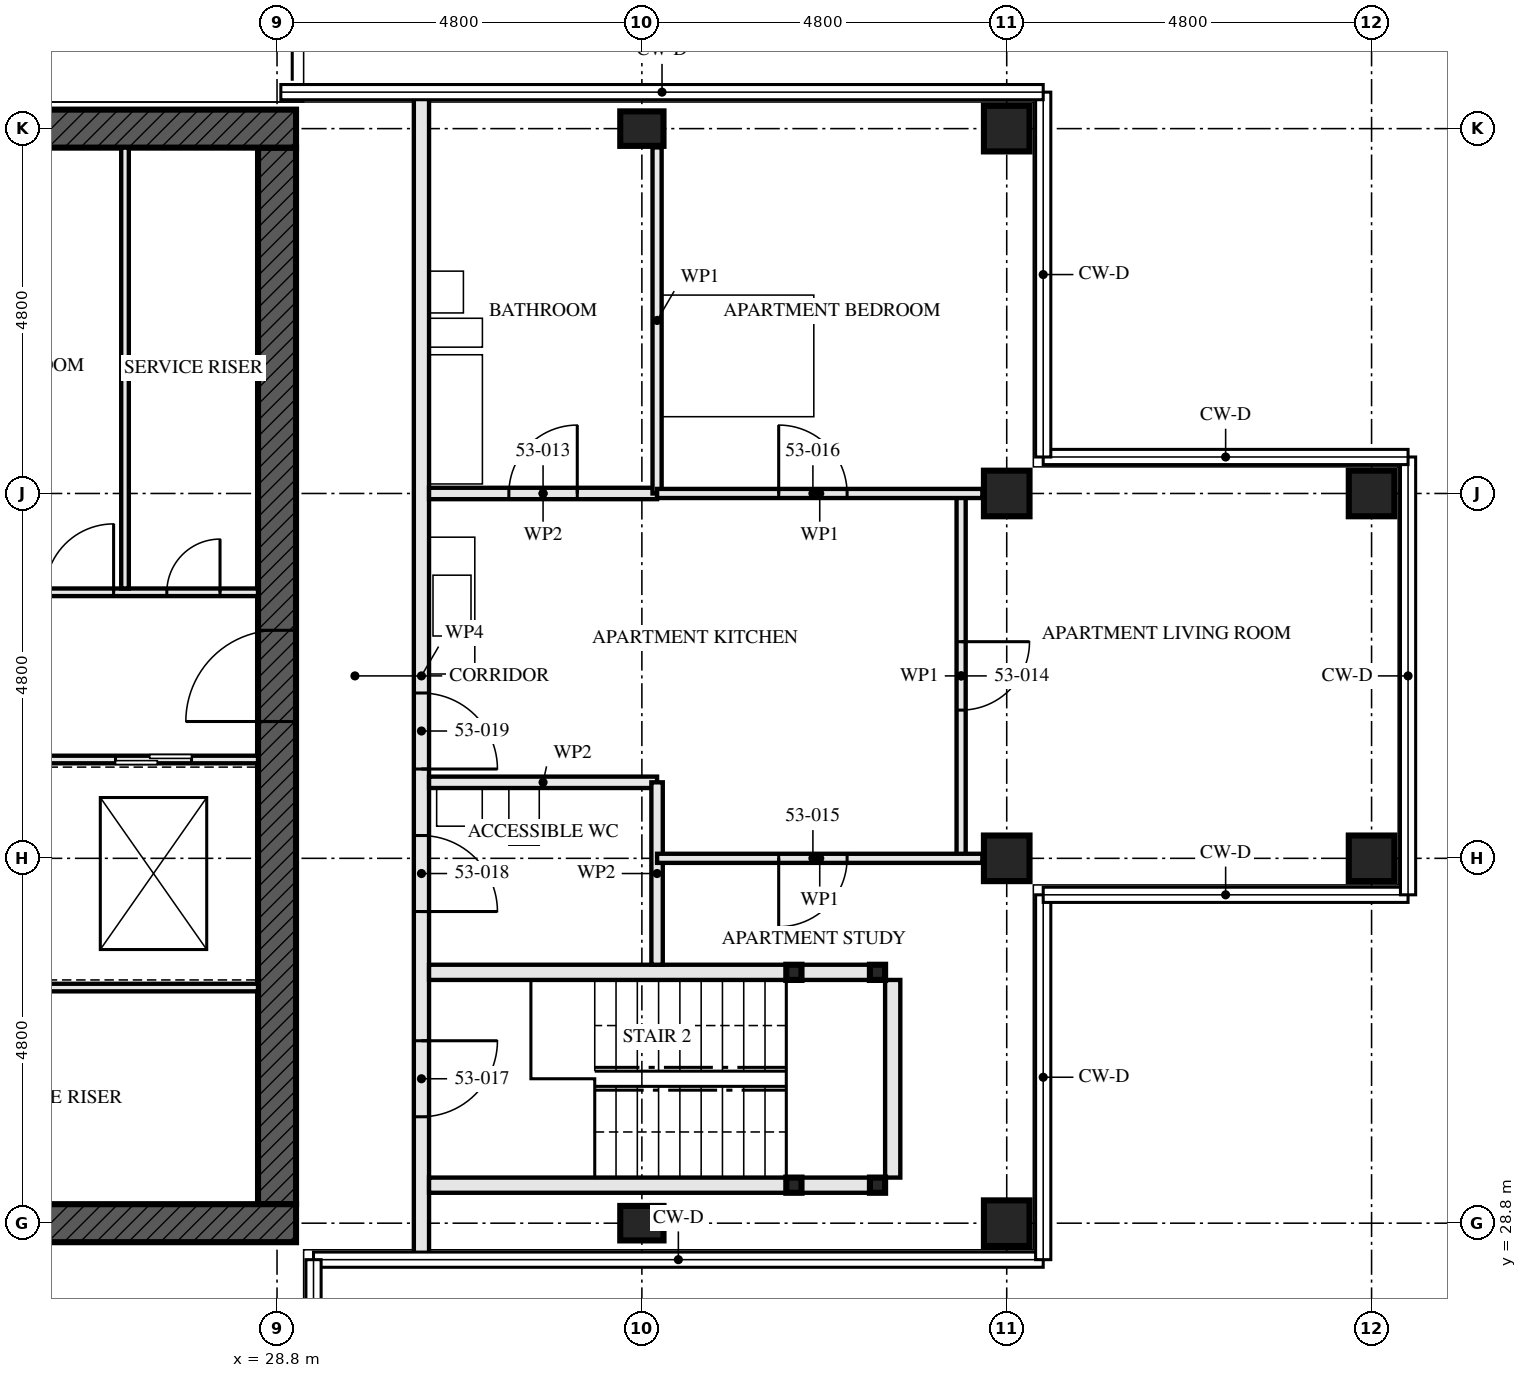
"""IFC4 building model, lengths in metres.
Left out: names, types, materials, properties, quantities, classifications, styles, units other than length and angle.
Written with IfcOpenShell. Run it as: python <this file> out.ifc"""

import sys

from ifc_helpers import new_model, si_unit, direction, frame, frame_2d, origin, origin_2d, place, context, subcontext, project, spatial, rectangle, hollow_rectangle, i_section, extrude, element, fill, save


model = new_model("IFC4")
c1 = context("Model", 3, precision=1e-05, world=origin(), true_north=direction((0.0, 1.0)))
c2 = subcontext(c1, "Body", "Model", "MODEL_VIEW")
j1 = project(units=[si_unit("LENGTHUNIT", "METRE"), si_unit("PLANEANGLEUNIT", "RADIAN")], contexts=[c1])
p1 = place(None, origin())
s1 = spatial("IfcSite", under=j1, at=p1, CompositionType="ELEMENT")
p2 = place(p1, origin())
s2 = spatial("IfcBuilding", under=s1, at=p2, CompositionType="ELEMENT")
p3 = place(p2, frame((0.0, 0.0, 194.5)))
s3 = spatial("IfcBuildingStorey", under=s2, at=p3, CompositionType="ELEMENT", Elevation=194.5)
for number, where, z_axis, x_axis in (
    (1, (33.6, 28.8, 0.0), (0.0, 0.0, 1.0), (0.0, 1.0, 0.0)),
    (2, (33.6, 43.2, 0.0), (0.0, 0.0, 1.0), (0.0, 1.0, 0.0)),
):
    element("IfcColumn", number, at=place(p3, frame(where, z_axis=z_axis, x_axis=x_axis)), inside=s3, PredefinedType="COLUMN", context=c2, shape_type="SweptSolid", body=[
        extrude(i_section(OverallWidth=0.454, OverallDepth=0.569, WebThickness=0.078, FlangeThickness=0.125, FilletRadius=0.015, at=origin_2d()), origin(), (0.0, 0.0, 1.0), 3.5),
    ])
for number, where, z_axis, x_axis in (
    (3, (38.4, 28.8, 0.0), (0.0, 0.0, 1.0), (0.0, 1.0, 0.0)),
    (4, (38.4, 33.6, 0.0), (0.0, 0.0, 1.0), (0.0, 1.0, 0.0)),
    (5, (38.4, 38.4, 0.0), (0.0, 0.0, 1.0), (0.0, 1.0, 0.0)),
    (6, (38.4, 43.2, 0.0), (0.0, 0.0, 1.0), (0.0, 1.0, 0.0)),
    (7, (43.2, 33.6, 0.0), (0.0, 0.0, 1.0), (0.0, 1.0, 0.0)),
    (8, (43.2, 38.4, 0.0), (0.0, 0.0, 1.0), (0.0, 1.0, 0.0)),
):
    element("IfcColumn", number, at=place(p3, frame(where, z_axis=z_axis, x_axis=x_axis)), inside=s3, PredefinedType="COLUMN", context=c2, shape_type="SweptSolid", body=[
        extrude(hollow_rectangle(XDim=0.6, YDim=0.6, WallThickness=0.05, at=origin_2d()), origin(), (0.0, 0.0, 1.0), 3.5),
    ])
p4 = place(p3, frame((14.15, 28.8, -0.17), z_axis=(0.0, 0.0, 1.0), x_axis=(1.0, 0.0, 0.0)))
e9 = element("IfcWall", 9, at=p4, inside=s3, PredefinedType="SHEAR", context=c2, shape_type="SweptSolid", body=[
    extrude(rectangle(XDim=14.9, YDim=0.5, at=frame_2d((7.45, 0.0))), origin(), (0.0, 0.0, 1.0), 3.5),
])
p5 = place(p4, frame((6.85, 0.0, 0.17)))
e10 = element("IfcOpeningElement", 10, at=p5, cuts=e9, PredefinedType="OPENING", context=c2, shape_type="SweptSolid", body=[
    extrude(rectangle(XDim=1.2, YDim=2.1, at=frame_2d((0.6, 1.05))), frame((0.0, 0.26, 0.0), z_axis=(0.0, -1.0, 0.0), x_axis=(1.0, 0.0, 0.0)), (0.0, 0.0, 1.0), 0.521),
])
p6 = place(p3, frame((29.05, 43.2, -0.17), z_axis=(0.0, 0.0, 1.0), x_axis=(-1.0, 0.0, 0.0)))
e11 = element("IfcWall", 11, at=p6, inside=s3, PredefinedType="SHEAR", context=c2, shape_type="SweptSolid", body=[
    extrude(rectangle(XDim=14.9, YDim=0.5, at=frame_2d((7.45, 0.0))), origin(), (0.0, 0.0, 1.0), 3.5),
])
p7 = place(p6, frame((6.95, 0.0, 0.17)))
e12 = element("IfcOpeningElement", 12, at=p7, cuts=e11, PredefinedType="OPENING", context=c2, shape_type="SweptSolid", body=[
    extrude(rectangle(XDim=1.0, YDim=2.4, at=frame_2d((0.5, 1.2))), frame((0.0, 0.26, 0.0), z_axis=(0.0, -1.0, 0.0), x_axis=(1.0, 0.0, 0.0)), (0.0, 0.0, 1.0), 0.521),
])
p8 = place(p3, frame((28.8, 29.05, -0.17), z_axis=(0.0, 0.0, 1.0), x_axis=(0.0, 1.0, 0.0)))
e13 = element("IfcWall", 13, at=p8, inside=s3, PredefinedType="SHEAR", context=c2, shape_type="SweptSolid", body=[
    extrude(rectangle(XDim=13.9, YDim=0.5, at=frame_2d((6.95, 0.0))), origin(), (0.0, 0.0, 1.0), 3.5),
])
p9 = place(p8, frame((6.35, 0.0, 0.17)))
e14 = element("IfcOpeningElement", 14, at=p9, cuts=e13, PredefinedType="OPENING", context=c2, shape_type="SweptSolid", body=[
    extrude(rectangle(XDim=1.2, YDim=2.1, at=frame_2d((0.6, 1.05))), frame((0.0, 0.26, 0.0), z_axis=(0.0, -1.0, 0.0), x_axis=(1.0, 0.0, 0.0)), (0.0, 0.0, 1.0), 0.521),
])
for number, where, z_axis, x_axis in (
    (15, (36.7, 29.3, 0.0), (0.0, 0.0, 1.0), (1.0, 0.0, 0.0)),
    (16, (36.7, 32.1, 0.0), (0.0, 0.0, 1.0), (1.0, 0.0, 0.0)),
    (17, (35.6, 29.3, 0.0), (0.0, 0.0, 1.0), (1.0, 0.0, 0.0)),
    (18, (35.6, 32.1, 0.0), (0.0, 0.0, 1.0), (1.0, 0.0, 0.0)),
):
    element("IfcColumn", number, at=place(p3, frame(where, z_axis=z_axis, x_axis=x_axis)), inside=s3, PredefinedType="COLUMN", context=c2, shape_type="SweptSolid", body=[
        extrude(hollow_rectangle(XDim=0.2, YDim=0.2, WallThickness=0.008, at=origin_2d()), origin(), (0.0, 0.0, 1.0), 3.33),
    ])
p10 = place(p3, frame((36.6, 29.3, 0.0), z_axis=(0.0, 0.0, 1.0), x_axis=(-1.0, 0.0, 0.0)))
e19 = element("IfcWall", 19, at=p10, inside=s3, PredefinedType="SOLIDWALL", context=c2, shape_type="SweptSolid", body=[
    extrude(rectangle(XDim=0.9, YDim=0.2, at=frame_2d((0.45, 0.0))), origin(), (0.0, 0.0, 1.0), 2.99),
])
p11 = place(p3, frame((35.5, 29.3, 0.0), z_axis=(0.0, 0.0, 1.0), x_axis=(-1.0, 0.0, 0.0)))
e20 = element("IfcWall", 20, at=p11, inside=s3, PredefinedType="SOLIDWALL", context=c2, shape_type="SweptSolid", body=[
    extrude(rectangle(XDim=4.7, YDim=0.2, at=frame_2d((2.35, 0.0))), origin(), (0.0, 0.0, 1.0), 2.99),
])
p12 = place(p3, frame((36.6, 32.1, 0.0), z_axis=(0.0, 0.0, 1.0), x_axis=(-1.0, 0.0, 0.0)))
e21 = element("IfcWall", 21, at=p12, inside=s3, PredefinedType="SOLIDWALL", context=c2, shape_type="SweptSolid", body=[
    extrude(rectangle(XDim=0.9, YDim=0.2, at=frame_2d((0.45, 0.0))), origin(), (0.0, 0.0, 1.0), 2.99),
])
p13 = place(p3, frame((35.5, 32.1, 0.0), z_axis=(0.0, 0.0, 1.0), x_axis=(-1.0, 0.0, 0.0)))
e22 = element("IfcWall", 22, at=p13, inside=s3, PredefinedType="SOLIDWALL", context=c2, shape_type="SweptSolid", body=[
    extrude(rectangle(XDim=4.7, YDim=0.2, at=frame_2d((2.35, 0.0))), origin(), (0.0, 0.0, 1.0), 2.99),
])
p14 = place(p3, frame((36.9, 29.4, 0.0), z_axis=(0.0, 0.0, 1.0), x_axis=(0.0, 1.0, 0.0)))
e23 = element("IfcWall", 23, at=p14, inside=s3, PredefinedType="SOLIDWALL", context=c2, shape_type="SweptSolid", body=[
    extrude(rectangle(XDim=2.6, YDim=0.2, at=frame_2d((1.3, 0.0))), origin(), (0.0, 0.0, 1.0), 3.33),
])
p15 = place(p3, frame((33.8, 32.2, 0.0), z_axis=(0.0, 0.0, 1.0), x_axis=(0.0, 1.0, 0.0)))
e24 = element("IfcWall", 24, at=p15, inside=s3, PredefinedType="PARTITIONING", context=c2, shape_type="SweptSolid", body=[
    extrude(rectangle(XDim=2.4, YDim=0.15, at=frame_2d((1.2, 0.0))), origin(), (0.0, 0.0, 1.0), 2.55),
])
p16 = place(p3, frame((33.8, 34.6, 0.0), z_axis=(0.0, 0.0, 1.0), x_axis=(-1.0, 0.0, 0.0)))
e25 = element("IfcWall", 25, at=p16, inside=s3, PredefinedType="PARTITIONING", context=c2, shape_type="SweptSolid", body=[
    extrude(rectangle(XDim=3.0, YDim=0.15, at=frame_2d((1.5, 0.0))), origin(), (0.0, 0.0, 1.0), 3.33),
])
p17 = place(p3, frame((33.8, 38.4, 0.0), z_axis=(0.0, 0.0, 1.0), x_axis=(-1.0, 0.0, 0.0)))
e26 = element("IfcWall", 26, at=p17, inside=s3, PredefinedType="PARTITIONING", context=c2, shape_type="SweptSolid", body=[
    extrude(rectangle(XDim=3.0, YDim=0.15, at=frame_2d((1.5, 0.0))), origin(), (0.0, 0.0, 1.0), 2.55),
])
p18 = place(p17, frame((1.05, 0.0, 0.0)))
e27 = element("IfcOpeningElement", 27, at=p18, cuts=e26, PredefinedType="OPENING", context=c2, shape_type="SweptSolid", body=[
    extrude(rectangle(XDim=0.9, YDim=2.1, at=frame_2d((0.45, 1.05))), frame((0.0, 0.085, 0.0), z_axis=(0.0, -1.0, 0.0), x_axis=(1.0, 0.0, 0.0)), (0.0, 0.0, 1.0), 0.171),
])
p19 = place(p3, frame((37.8, 33.6, 0.0), z_axis=(0.0, 0.0, 1.0), x_axis=(0.0, 1.0, 0.0)))
e28 = element("IfcWall", 28, at=p19, inside=s3, PredefinedType="PARTITIONING", context=c2, shape_type="SweptSolid", body=[
    extrude(rectangle(XDim=4.8, YDim=0.12, at=frame_2d((2.4, 0.0))), origin(), (0.0, 0.0, 1.0), 3.33),
])
p20 = place(p19, frame((1.95, 0.0, 0.0)))
e29 = element("IfcOpeningElement", 29, at=p20, cuts=e28, PredefinedType="OPENING", context=c2, shape_type="SweptSolid", body=[
    extrude(rectangle(XDim=0.9, YDim=2.1, at=frame_2d((0.45, 1.05))), frame((0.0, 0.071, 0.0), z_axis=(0.0, -1.0, 0.0), x_axis=(1.0, 0.0, 0.0)), (0.0, 0.0, 1.0), 0.141),
])
p21 = place(p3, frame((33.8, 38.4, 0.0), z_axis=(0.0, 0.0, 1.0), x_axis=(0.0, 1.0, 0.0)))
e30 = element("IfcWall", 30, at=p21, inside=s3, PredefinedType="PARTITIONING", context=c2, shape_type="SweptSolid", body=[
    extrude(rectangle(XDim=4.553, YDim=0.12, at=frame_2d((2.276, 0.0))), origin(), (0.0, 0.0, 1.0), 3.33),
])
p22 = place(p3, frame((38.08, 33.6, 0.0), z_axis=(0.0, 0.0, 1.0), x_axis=(-1.0, 0.0, 0.0)))
e31 = element("IfcWall", 31, at=p22, inside=s3, PredefinedType="PARTITIONING", context=c2, shape_type="SweptSolid", body=[
    extrude(rectangle(XDim=4.28, YDim=0.12, at=frame_2d((2.14, 0.0))), origin(), (0.0, 0.0, 1.0), 2.55),
])
p23 = place(p22, frame((1.78, 0.0, 0.0)))
e32 = element("IfcOpeningElement", 32, at=p23, cuts=e31, PredefinedType="OPENING", context=c2, shape_type="SweptSolid", body=[
    extrude(rectangle(XDim=0.9, YDim=2.1, at=frame_2d((0.45, 1.05))), frame((0.0, 0.071, 0.0), z_axis=(0.0, -1.0, 0.0), x_axis=(1.0, 0.0, 0.0)), (0.0, 0.0, 1.0), 0.141),
])
p24 = place(p3, frame((38.08, 38.4, 0.0), z_axis=(0.0, 0.0, 1.0), x_axis=(-1.0, 0.0, 0.0)))
e33 = element("IfcWall", 33, at=p24, inside=s3, PredefinedType="PARTITIONING", context=c2, shape_type="SweptSolid", body=[
    extrude(rectangle(XDim=4.28, YDim=0.12, at=frame_2d((2.14, 0.0))), origin(), (0.0, 0.0, 1.0), 2.55),
])
p25 = place(p24, frame((1.78, 0.0, 0.0)))
e34 = element("IfcOpeningElement", 34, at=p25, cuts=e33, PredefinedType="OPENING", context=c2, shape_type="SweptSolid", body=[
    extrude(rectangle(XDim=0.9, YDim=2.1, at=frame_2d((0.45, 1.05))), frame((0.0, 0.071, 0.0), z_axis=(0.0, -1.0, 0.0), x_axis=(1.0, 0.0, 0.0)), (0.0, 0.0, 1.0), 0.141),
])
p26 = place(p3, frame((30.7, 28.345, 0.0), z_axis=(0.0, 0.0, 1.0), x_axis=(0.0, 1.0, 0.0)))
e35 = element("IfcWall", 35, at=p26, inside=s3, PredefinedType="PARTITIONING", context=c2, shape_type="SweptSolid", body=[
    extrude(rectangle(XDim=15.31, YDim=0.2, at=frame_2d((7.655, 0.0))), origin(), (0.0, 0.0, 1.0), 2.32),
])
p27 = place(p26, frame((1.855, 0.0, 0.0)))
e36 = element("IfcOpeningElement", 36, at=p27, cuts=e35, PredefinedType="OPENING", context=c2, shape_type="SweptSolid", body=[
    extrude(rectangle(XDim=1.0, YDim=2.1, at=frame_2d((0.5, 1.05))), frame((0.0, 0.111, 0.0), z_axis=(0.0, -1.0, 0.0), x_axis=(1.0, 0.0, 0.0)), (0.0, 0.0, 1.0), 0.221),
])
p28 = place(p26, frame((4.555, 0.0, 0.0)))
e37 = element("IfcOpeningElement", 37, at=p28, cuts=e35, PredefinedType="OPENING", context=c2, shape_type="SweptSolid", body=[
    extrude(rectangle(XDim=1.0, YDim=2.1, at=frame_2d((0.5, 1.05))), frame((0.0, 0.111, 0.0), z_axis=(0.0, -1.0, 0.0), x_axis=(1.0, 0.0, 0.0)), (0.0, 0.0, 1.0), 0.221),
])
p29 = place(p26, frame((6.43, 0.0, 0.0)))
e38 = element("IfcOpeningElement", 38, at=p29, cuts=e35, PredefinedType="OPENING", context=c2, shape_type="SweptSolid", body=[
    extrude(rectangle(XDim=1.0, YDim=2.1, at=frame_2d((0.5, 1.05))), frame((0.0, 0.111, 0.0), z_axis=(0.0, -1.0, 0.0), x_axis=(1.0, 0.0, 0.0)), (0.0, 0.0, 1.0), 0.221),
])
p30 = place(p3, frame((26.8, 37.15, 0.0), z_axis=(0.0, 0.0, 1.0), x_axis=(0.0, 1.0, 0.0)))
e39 = element("IfcWall", 39, at=p30, inside=s3, PredefinedType="SOLIDWALL", context=c2, shape_type="SweptSolid", body=[
    extrude(rectangle(XDim=5.8, YDim=0.1, at=frame_2d((2.9, 0.0))), origin(), (0.0, 0.0, 1.0), 3.33),
])
p31 = place(p3, frame((23.05, 34.9, 0.0), z_axis=(0.0, 0.0, 1.0), x_axis=(1.0, 0.0, 0.0)))
e40 = element("IfcWall", 40, at=p31, inside=s3, PredefinedType="SOLIDWALL", context=c2, shape_type="SweptSolid", body=[
    extrude(rectangle(XDim=5.5, YDim=0.1, at=frame_2d((2.75, 0.0))), origin(), (0.0, 0.0, 1.0), 3.33),
])
p32 = place(p31, frame((0.85, 0.0, 0.0)))
e41 = element("IfcOpeningElement", 41, at=p32, cuts=e40, PredefinedType="OPENING", context=c2, shape_type="SweptSolid", body=[
    extrude(rectangle(XDim=1.0, YDim=2.1, at=frame_2d((0.5, 1.05))), frame((0.0, 0.061, 0.0), z_axis=(0.0, -1.0, 0.0), x_axis=(1.0, 0.0, 0.0)), (0.0, 0.0, 1.0), 0.121),
])
p33 = place(p31, frame((3.625, 0.0, 0.0)))
e42 = element("IfcOpeningElement", 42, at=p33, cuts=e40, PredefinedType="OPENING", context=c2, shape_type="SweptSolid", body=[
    extrude(rectangle(XDim=1.0, YDim=2.1, at=frame_2d((0.5, 1.05))), frame((0.0, 0.061, 0.0), z_axis=(0.0, -1.0, 0.0), x_axis=(1.0, 0.0, 0.0)), (0.0, 0.0, 1.0), 0.121),
])
p34 = place(p3, frame((22.65, 37.1, 0.0), z_axis=(0.0, 0.0, 1.0), x_axis=(1.0, 0.0, 0.0)))
e43 = element("IfcWall", 43, at=p34, inside=s3, PredefinedType="SOLIDWALL", context=c2, shape_type="SweptSolid", body=[
    extrude(rectangle(XDim=5.9, YDim=0.1, at=frame_2d((2.95, 0.0))), origin(), (0.0, 0.0, 1.0), 3.33),
])
p35 = place(p34, frame((3.1, 0.0, 0.0)))
e44 = element("IfcOpeningElement", 44, at=p35, cuts=e43, PredefinedType="OPENING", context=c2, shape_type="SweptSolid", body=[
    extrude(rectangle(XDim=0.9, YDim=2.1, at=frame_2d((0.45, 1.05))), frame((0.0, 0.061, 0.0), z_axis=(0.0, -1.0, 0.0), x_axis=(1.0, 0.0, 0.0)), (0.0, 0.0, 1.0), 0.121),
])
p36 = place(p34, frame((4.7, 0.0, 0.0)))
e45 = element("IfcOpeningElement", 45, at=p36, cuts=e43, PredefinedType="OPENING", context=c2, shape_type="SweptSolid", body=[
    extrude(rectangle(XDim=0.7, YDim=2.1, at=frame_2d((0.35, 1.05))), frame((0.0, 0.061, 0.0), z_axis=(0.0, -1.0, 0.0), x_axis=(1.0, 0.0, 0.0)), (0.0, 0.0, 1.0), 0.121),
])
p37 = place(p3, frame((23.15, 31.9, 0.0), z_axis=(0.0, 0.0, 1.0), x_axis=(1.0, 0.0, 0.0)))
e46 = element("IfcWall", 46, at=p37, inside=s3, PredefinedType="SOLIDWALL", context=c2, shape_type="SweptSolid", body=[
    extrude(rectangle(XDim=5.4, YDim=0.1, at=frame_2d((2.7, 0.0))), origin(), (0.0, 0.0, 1.0), 3.33),
])
p38 = place(p18, frame((0.9, 0.0, 0.0), z_axis=(0.0, 0.0, 1.0), x_axis=(-1.0, 0.0, 0.0)))
e47 = element("IfcDoor", 47, at=p38, inside=s3, OperationType="SINGLE_SWING_LEFT", PredefinedType="DOOR", context=c2, shape_type="SweptSolid", body=[
    extrude(rectangle(XDim=0.9, YDim=2.1, at=frame_2d((0.45, 1.05))), frame((0.0, 0.022, 0.0), z_axis=(0.0, -1.0, 0.0), x_axis=(1.0, 0.0, 0.0)), (0.0, 0.0, 1.0), 0.044),
])
fill(e27, e47)
p39 = place(p20, frame((0.9, 0.0, 0.0), z_axis=(0.0, 0.0, 1.0), x_axis=(-1.0, 0.0, 0.0)))
e48 = element("IfcDoor", 48, at=p39, inside=s3, OperationType="SINGLE_SWING_RIGHT", PredefinedType="DOOR", context=c2, shape_type="SweptSolid", body=[
    extrude(rectangle(XDim=0.9, YDim=2.1, at=frame_2d((0.45, 1.05))), frame((0.0, 0.022, 0.0), z_axis=(0.0, -1.0, 0.0), x_axis=(1.0, 0.0, 0.0)), (0.0, 0.0, 1.0), 0.044),
])
fill(e29, e48)
p40 = place(p23, origin())
e49 = element("IfcDoor", 49, at=p40, inside=s3, OperationType="SINGLE_SWING_LEFT", PredefinedType="DOOR", context=c2, shape_type="SweptSolid", body=[
    extrude(rectangle(XDim=0.9, YDim=2.1, at=frame_2d((0.45, 1.05))), frame((0.0, 0.022, 0.0), z_axis=(0.0, -1.0, 0.0), x_axis=(1.0, 0.0, 0.0)), (0.0, 0.0, 1.0), 0.044),
])
fill(e32, e49)
p41 = place(p25, frame((0.9, 0.0, 0.0), z_axis=(0.0, 0.0, 1.0), x_axis=(-1.0, 0.0, 0.0)))
e50 = element("IfcDoor", 50, at=p41, inside=s3, OperationType="SINGLE_SWING_RIGHT", PredefinedType="DOOR", context=c2, shape_type="SweptSolid", body=[
    extrude(rectangle(XDim=0.9, YDim=2.1, at=frame_2d((0.45, 1.05))), frame((0.0, 0.022, 0.0), z_axis=(0.0, -1.0, 0.0), x_axis=(1.0, 0.0, 0.0)), (0.0, 0.0, 1.0), 0.044),
])
fill(e34, e50)
p42 = place(p27, frame((1.0, 0.0, 0.0), z_axis=(0.0, 0.0, 1.0), x_axis=(-1.0, 0.0, 0.0)))
e51 = element("IfcDoor", 51, at=p42, inside=s3, OperationType="SINGLE_SWING_RIGHT", PredefinedType="DOOR", context=c2, shape_type="SweptSolid", body=[
    extrude(rectangle(XDim=1.0, YDim=2.1, at=frame_2d((0.5, 1.05))), frame((0.0, 0.032, 0.0), z_axis=(0.0, -1.0, 0.0), x_axis=(1.0, 0.0, 0.0)), (0.0, 0.0, 1.0), 0.064),
])
fill(e36, e51)
p43 = place(p28, frame((1.0, 0.0, 0.0), z_axis=(0.0, 0.0, 1.0), x_axis=(-1.0, 0.0, 0.0)))
e52 = element("IfcDoor", 52, at=p43, inside=s3, OperationType="SINGLE_SWING_LEFT", PredefinedType="DOOR", context=c2, shape_type="SweptSolid", body=[
    extrude(rectangle(XDim=1.0, YDim=2.1, at=frame_2d((0.5, 1.05))), frame((0.0, 0.027, 0.0), z_axis=(0.0, -1.0, 0.0), x_axis=(1.0, 0.0, 0.0)), (0.0, 0.0, 1.0), 0.054),
])
fill(e37, e52)
p44 = place(p29, frame((1.0, 0.0, 0.0), z_axis=(0.0, 0.0, 1.0), x_axis=(-1.0, 0.0, 0.0)))
e53 = element("IfcDoor", 53, at=p44, inside=s3, OperationType="SINGLE_SWING_LEFT", PredefinedType="DOOR", context=c2, shape_type="SweptSolid", body=[
    extrude(rectangle(XDim=1.0, YDim=2.1, at=frame_2d((0.5, 1.05))), frame((0.0, 0.027, 0.0), z_axis=(0.0, -1.0, 0.0), x_axis=(1.0, 0.0, 0.0)), (0.0, 0.0, 1.0), 0.054),
])
fill(e38, e53)
p45 = place(p33, origin())
e54 = element("IfcDoor", 54, at=p45, inside=s3, OperationType="SLIDING_TO_LEFT", PredefinedType="DOOR", context=c2, shape_type="SweptSolid", body=[
    extrude(rectangle(XDim=1.0, YDim=2.1, at=frame_2d((0.5, 1.05))), frame((0.0, 0.05, 0.0), z_axis=(0.0, -1.0, 0.0), x_axis=(1.0, 0.0, 0.0)), (0.0, 0.0, 1.0), 0.1),
])
fill(e42, e54)
p46 = place(p35, origin())
e55 = element("IfcDoor", 55, at=p46, inside=s3, OperationType="SINGLE_SWING_LEFT", PredefinedType="DOOR", context=c2, shape_type="SweptSolid", body=[
    extrude(rectangle(XDim=0.9, YDim=2.1, at=frame_2d((0.45, 1.05))), frame((0.0, 0.027, 0.0), z_axis=(0.0, -1.0, 0.0), x_axis=(1.0, 0.0, 0.0)), (0.0, 0.0, 1.0), 0.054),
])
fill(e44, e55)
p47 = place(p36, origin())
e56 = element("IfcDoor", 56, at=p47, inside=s3, OperationType="SINGLE_SWING_LEFT", PredefinedType="DOOR", context=c2, shape_type="SweptSolid", body=[
    extrude(rectangle(XDim=0.7, YDim=2.1, at=frame_2d((0.35, 1.05))), frame((0.0, 0.027, 0.0), z_axis=(0.0, -1.0, 0.0), x_axis=(1.0, 0.0, 0.0)), (0.0, 0.0, 1.0), 0.054),
])
fill(e45, e56)
p48 = place(p9, origin())
e57 = element("IfcDoor", 57, at=p48, inside=s3, OperationType="SINGLE_SWING_LEFT", PredefinedType="DOOR", context=c2, shape_type="SweptSolid", body=[
    extrude(rectangle(XDim=1.2, YDim=2.1, at=frame_2d((0.6, 1.05))), frame((0.0, 0.027, 0.0), z_axis=(0.0, -1.0, 0.0), x_axis=(1.0, 0.0, 0.0)), (0.0, 0.0, 1.0), 0.054),
])
fill(e14, e57)
save(model, sys.argv[1])
